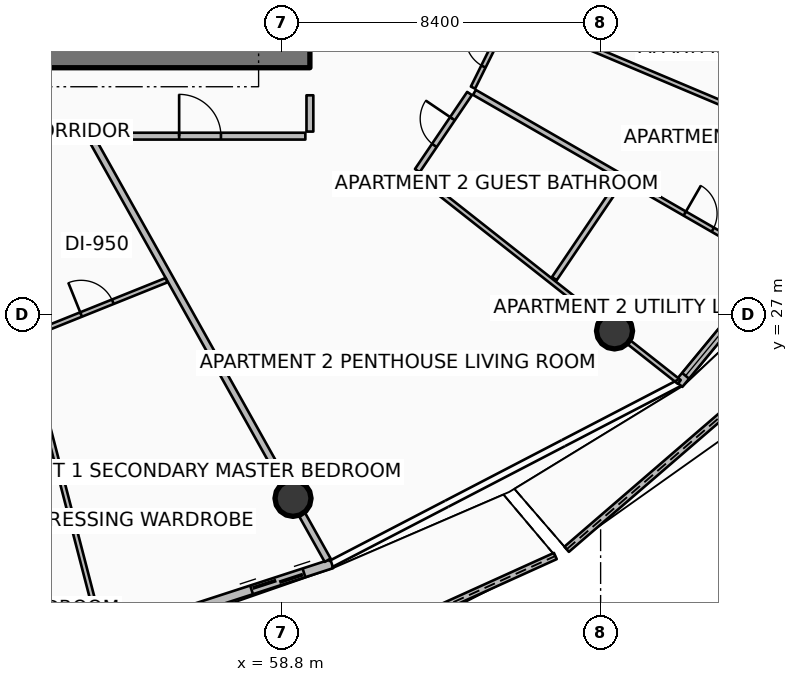
"""IFC4 building model, lengths in metres.
Left out: names, types, materials, properties, quantities, classifications, styles, units other than length and angle.
Written with IfcOpenShell. Run it as: python <this file> out.ifc"""

import sys

from ifc_helpers import new_model, si_unit, direction, frame, frame_2d, origin, origin_2d, place, context, subcontext, project, spatial, polyline, rectangle, circle, outline, extrude, element, fill, save


model = new_model("IFC4")
c1 = context("Model", 3, precision=1e-05, world=origin(), true_north=direction((0.0, 1.0)))
c2 = subcontext(c1, "Body", "Model", "MODEL_VIEW")
j1 = project(units=[si_unit("LENGTHUNIT", "METRE"), si_unit("PLANEANGLEUNIT", "RADIAN")], contexts=[c1])
p1 = place(None, origin())
s1 = spatial("IfcSite", under=j1, at=p1, CompositionType="ELEMENT")
p2 = place(p1, origin())
s2 = spatial("IfcBuilding", under=s1, at=p2, CompositionType="ELEMENT")
p3 = place(p2, frame((0.0, 0.0, 294.45)))
s3 = spatial("IfcBuildingStorey", under=s2, at=p3, CompositionType="ELEMENT", Elevation=294.45)
p4 = place(p3, frame((49.95, 33.75, 0.0), z_axis=(0.0, 0.0, 1.0), x_axis=(1.0, 0.0, 0.0)))
e1 = element("IfcWall", 1, at=p4, inside=s3, PredefinedType="SHEAR", context=c2, shape_type="SweptSolid", body=[
    extrude(rectangle(XDim=9.6, YDim=0.5, at=frame_2d((4.8, 0.0))), origin(), (0.0, 0.0, 1.0), 3.85),
])
for number, where, z_axis, x_axis in (
    (2, (59.105, 22.17, 0.0), (0.0, 0.0, 1.0), (1.0, 0.0, 0.0)),
    (3, (67.566, 26.575, 0.0), (0.0, 0.0, 1.0), (1.0, 0.0, 0.0)),
):
    element("IfcColumn", number, at=place(p3, frame(where, z_axis=z_axis, x_axis=x_axis)), inside=s3, PredefinedType="COLUMN", context=c2, shape_type="SweptSolid", body=[
        extrude(circle(Radius=0.475, at=origin_2d()), origin(), (0.0, 0.0, 1.0), 3.59),
    ])
p5 = place(p3, frame((56.466, 16.33, 0.0), z_axis=(0.0, 0.0, 1.0), x_axis=(0.910900469726, 0.412626143444, 0.0)))
e4 = element("IfcWall", 4, at=p5, inside=s3, PredefinedType="PARAPET", context=c2, shape_type="SweptSolid", body=[
    extrude(outline(polyline([(0.0, 0.0), (10.476, 0.0), (10.476, 1.497), (5.238, 1.696), (0.0, 1.832), (0.0, 0.0)])), frame((0.0, 0.09, 0.0), z_axis=(0.0, -1.0, 0.0), x_axis=(1.0, 0.0, 0.0)), (0.0, 0.0, 1.0), 0.18),
])
p6 = place(p3, frame((66.306, 20.83, 0.0), z_axis=(0.0, 0.0, 1.0), x_axis=(0.757188428153, 0.653196512751, 0.0)))
e5 = element("IfcWall", 5, at=p6, inside=s3, PredefinedType="PARAPET", context=c2, shape_type="SweptSolid", body=[
    extrude(outline(polyline([(0.0, 0.0), (11.278, 0.0), (11.278, 1.148), (5.639, 1.284), (0.0, 1.483), (0.0, 0.0)])), frame((0.0, 0.09, 0.0), z_axis=(0.0, -1.0, 0.0), x_axis=(1.0, 0.0, 0.0)), (0.0, 0.0, 1.0), 0.18),
])
p7 = place(p3, frame((50.858, 17.436, 0.0), z_axis=(0.0, 0.0, 1.0), x_axis=(0.951055974609, 0.309018661507, 0.0)))
e6 = element("IfcWall", 6, at=p7, inside=s3, PredefinedType="SOLIDWALL", context=c2, shape_type="SweptSolid", body=[
    extrude(rectangle(XDim=9.745, YDim=0.24, at=frame_2d((4.873, 0.0))), origin(), (0.0, 0.0, 1.0), 2.54),
])
p8 = place(p7, frame((7.525, 0.0, 0.0)))
e7 = element("IfcOpeningElement", 7, at=p8, cuts=e6, PredefinedType="OPENING", context=c2, shape_type="SweptSolid", body=[
    extrude(rectangle(XDim=1.45, YDim=2.15, at=frame_2d((0.725, 1.075))), frame((0.0, 0.13, 0.0), z_axis=(0.0, -1.0, 0.0), x_axis=(1.0, 0.0, 0.0)), (0.0, 0.0, 1.0), 0.26),
])
p9 = place(p7, frame((0.28, 0.0, 0.65)))
e8 = element("IfcOpeningElement", 8, at=p9, cuts=e6, PredefinedType="OPENING", context=c2, shape_type="SweptSolid", body=[
    extrude(rectangle(XDim=1.6, YDim=1.5, at=frame_2d((0.8, 0.75))), frame((0.0, 0.13, 0.0), z_axis=(0.0, -1.0, 0.0), x_axis=(1.0, 0.0, 0.0)), (0.0, 0.0, 1.0), 0.26),
])
p10 = place(p3, frame((69.258, 25.178, 0.0), z_axis=(0.0, 0.0, 1.0), x_axis=(0.636680093065, 0.771128043255, 0.0)))
e9 = element("IfcWall", 9, at=p10, inside=s3, PredefinedType="SOLIDWALL", context=c2, shape_type="SweptSolid", body=[
    extrude(rectangle(XDim=11.438, YDim=0.24, at=frame_2d((5.719, 0.0))), origin(), (0.0, 0.0, 1.0), 2.54),
])
p11 = place(p10, frame((9.218, 0.0, 0.0)))
e10 = element("IfcOpeningElement", 10, at=p11, cuts=e9, PredefinedType="OPENING", context=c2, shape_type="SweptSolid", body=[
    extrude(rectangle(XDim=1.45, YDim=2.15, at=frame_2d((0.725, 1.075))), frame((0.0, 0.13, 0.0), z_axis=(0.0, -1.0, 0.0), x_axis=(1.0, 0.0, 0.0)), (0.0, 0.0, 1.0), 0.26),
])
p12 = place(p10, frame((0.28, 0.0, 0.65)))
e11 = element("IfcOpeningElement", 11, at=p12, cuts=e9, PredefinedType="OPENING", context=c2, shape_type="SweptSolid", body=[
    extrude(rectangle(XDim=1.6, YDim=1.5, at=frame_2d((0.8, 0.75))), frame((0.0, 0.13, 0.0), z_axis=(0.0, -1.0, 0.0), x_axis=(1.0, 0.0, 0.0)), (0.0, 0.0, 1.0), 0.26),
])
p13 = place(p3, frame((53.822, 31.604, 0.0), z_axis=(0.0, 0.0, 1.0), x_axis=(0.48862858053, -0.872491896976, 0.0)))
e12 = element("IfcWall", 12, at=p13, inside=s3, PredefinedType="PARTITIONING", context=c2, shape_type="SweptSolid", body=[
    extrude(rectangle(XDim=12.679, YDim=0.18, at=frame_2d((6.34, 0.0))), origin(), (0.0, 0.0, 1.0), 2.957),
])
p14 = place(p3, frame((49.339, 31.7, 0.0), z_axis=(0.0, 0.0, 1.0), x_axis=(1.0, 0.0, 0.0)))
e13 = element("IfcWall", 13, at=p14, inside=s3, PredefinedType="PARTITIONING", context=c2, shape_type="SweptSolid", body=[
    extrude(rectangle(XDim=4.309, YDim=0.18, at=frame_2d((2.155, 0.0))), origin(), (0.0, 0.0, 1.0), 2.957),
])
p15 = place(p3, frame((52.065, 26.323, 0.0), z_axis=(0.0, 0.0, 1.0), x_axis=(0.250968538736, -0.967995244082, 0.0)))
e14 = element("IfcWall", 14, at=p15, inside=s3, PredefinedType="PARTITIONING", context=c2, shape_type="SweptSolid", body=[
    extrude(rectangle(XDim=7.968, YDim=0.125, at=frame_2d((3.984, 0.0))), origin(), (0.0, 0.0, 1.0), 3.03),
])
p16 = place(p3, frame((52.116, 26.439, 0.0), z_axis=(0.0, 0.0, 1.0), x_axis=(0.92786943094, 0.372905241486, 0.0)))
e15 = element("IfcWall", 15, at=p16, inside=s3, PredefinedType="PARTITIONING", context=c2, shape_type="SweptSolid", body=[
    extrude(rectangle(XDim=3.945, YDim=0.125, at=frame_2d((1.973, 0.0))), origin(), (0.0, 0.0, 1.0), 2.957),
])
p17 = place(p16, frame((1.523, 0.0, 0.0)))
e16 = element("IfcOpeningElement", 16, at=p17, cuts=e15, PredefinedType="OPENING", context=c2, shape_type="SweptSolid", body=[
    extrude(rectangle(XDim=0.9, YDim=2.08, at=frame_2d((0.45, 1.04))), frame((0.0, 0.073, 0.0), z_axis=(0.0, -1.0, 0.0), x_axis=(1.0, 0.0, 0.0)), (0.0, 0.0, 1.0), 0.145),
])
p18 = place(p3, frame((53.888, 31.7, 0.0), z_axis=(0.0, 0.0, 1.0), x_axis=(1.0, 0.0, 0.0)))
e17 = element("IfcWall", 17, at=p18, inside=s3, PredefinedType="PARTITIONING", context=c2, shape_type="SweptSolid", body=[
    extrude(rectangle(XDim=5.542, YDim=0.18, at=frame_2d((2.771, 0.0))), origin(), (0.0, 0.0, 1.0), 2.957),
])
p19 = place(p18, frame((2.221, 0.0, 0.0)))
e18 = element("IfcOpeningElement", 18, at=p19, cuts=e17, PredefinedType="OPENING", context=c2, shape_type="SweptSolid", body=[
    extrude(rectangle(XDim=1.1, YDim=2.1, at=frame_2d((0.55, 1.05))), frame((0.0, 0.1, 0.0), z_axis=(0.0, -1.0, 0.0), x_axis=(1.0, 0.0, 0.0)), (0.0, 0.0, 1.0), 0.2),
])
p20 = place(p3, frame((59.55, 31.82, 0.0), z_axis=(0.0, 0.0, 1.0), x_axis=(0.0, 1.0, 0.0)))
e19 = element("IfcWall", 19, at=p20, inside=s3, PredefinedType="PARTITIONING", context=c2, shape_type="SweptSolid", body=[
    extrude(rectangle(XDim=0.955, YDim=0.18, at=frame_2d((0.477, 0.0))), origin(), (0.0, 0.0, 1.0), 2.957),
])
p21 = place(p3, frame((62.399, 30.648, 0.0), z_axis=(0.0, 0.0, 1.0), x_axis=(0.785335435896, -0.619070475088, 0.0)))
e20 = element("IfcWall", 20, at=p21, inside=s3, PredefinedType="PARTITIONING", context=c2, shape_type="SweptSolid", body=[
    extrude(rectangle(XDim=8.749, YDim=0.125, at=frame_2d((4.374, 0.0))), origin(), (0.0, 0.0, 1.0), 2.957),
])
p22 = place(p3, frame((62.377, 30.793, 0.0), z_axis=(0.0, 0.0, 1.0), x_axis=(0.560572719222, 0.828105202534, 0.0)))
e21 = element("IfcWall", 21, at=p22, inside=s3, PredefinedType="PARTITIONING", context=c2, shape_type="SweptSolid", body=[
    extrude(rectangle(XDim=2.45, YDim=0.15, at=frame_2d((1.225, 0.0))), origin(), (0.0, 0.0, 1.0), 2.957),
])
p23 = place(p22, frame((0.8, 0.0, 0.0)))
e22 = element("IfcOpeningElement", 22, at=p23, cuts=e21, PredefinedType="OPENING", context=c2, shape_type="SweptSolid", body=[
    extrude(rectangle(XDim=0.85, YDim=2.06, at=frame_2d((0.425, 1.03))), frame((0.0, 0.085, 0.0), z_axis=(0.0, -1.0, 0.0), x_axis=(1.0, 0.0, 0.0)), (0.0, 0.0, 1.0), 0.17),
])
p24 = place(p3, frame((65.982, 27.951, 0.0), z_axis=(0.0, 0.0, 1.0), x_axis=(0.560619338422, 0.82807364249, 0.0)))
e23 = element("IfcWall", 23, at=p24, inside=s3, PredefinedType="PARTITIONING", context=c2, shape_type="SweptSolid", body=[
    extrude(rectangle(XDim=3.115, YDim=0.15, at=frame_2d((1.557, 0.0))), origin(), (0.0, 0.0, 1.0), 2.957),
])
p25 = place(p3, frame((63.879, 32.852, 0.0), z_axis=(0.0, 0.0, 1.0), x_axis=(0.866472506867, -0.499224793899, 0.0)))
e24 = element("IfcWall", 24, at=p25, inside=s3, PredefinedType="PARTITIONING", context=c2, shape_type="SweptSolid", body=[
    extrude(rectangle(XDim=4.46, YDim=0.15, at=frame_2d((2.23, 0.0))), origin(), (0.0, 0.0, 1.0), 3.03),
])
p26 = place(p3, frame((67.856, 30.56, 0.0), z_axis=(0.0, 0.0, 1.0), x_axis=(0.86648068721, -0.499210595533, 0.0)))
e25 = element("IfcWall", 25, at=p26, inside=s3, PredefinedType="PARTITIONING", context=c2, shape_type="SweptSolid", body=[
    extrude(rectangle(XDim=4.447, YDim=0.125, at=frame_2d((2.223, 0.0))), origin(), (0.0, 0.0, 1.0), 3.03),
])
p27 = place(p26, frame((1.798, 0.0, 0.0)))
e26 = element("IfcOpeningElement", 26, at=p27, cuts=e25, PredefinedType="OPENING", context=c2, shape_type="SweptSolid", body=[
    extrude(rectangle(XDim=0.85, YDim=2.06, at=frame_2d((0.425, 1.03))), frame((0.0, 0.073, 0.0), z_axis=(0.0, -1.0, 0.0), x_axis=(1.0, 0.0, 0.0)), (0.0, 0.0, 1.0), 0.145),
])
p28 = place(p3, frame((64.888, 34.884, 0.0), z_axis=(0.0, 0.0, 1.0), x_axis=(0.921531711532, -0.388303109235, 0.0)))
e27 = element("IfcWall", 27, at=p28, inside=s3, PredefinedType="PARTITIONING", context=c2, shape_type="SweptSolid", body=[
    extrude(rectangle(XDim=9.845, YDim=0.125, at=frame_2d((4.922, 0.0))), origin(), (0.0, 0.0, 1.0), 3.03),
])
p29 = place(p3, frame((63.841, 32.977, 0.0), z_axis=(0.0, 0.0, 1.0), x_axis=(0.444545737729, 0.895756153798, 0.0)))
e28 = element("IfcWall", 28, at=p29, inside=s3, PredefinedType="PARTITIONING", context=c2, shape_type="SweptSolid", body=[
    extrude(rectangle(XDim=2.088, YDim=0.125, at=frame_2d((1.044, 0.0))), origin(), (0.0, 0.0, 1.0), 3.03),
])
p30 = place(p29, frame((0.619, 0.0, 0.0)))
e29 = element("IfcOpeningElement", 29, at=p30, cuts=e28, PredefinedType="OPENING", context=c2, shape_type="SweptSolid", body=[
    extrude(rectangle(XDim=0.85, YDim=2.06, at=frame_2d((0.425, 1.03))), frame((0.0, 0.073, 0.0), z_axis=(0.0, -1.0, 0.0), x_axis=(1.0, 0.0, 0.0)), (0.0, 0.0, 1.0), 0.145),
])
p31 = place(p8, origin())
e30 = element("IfcDoor", 30, at=p31, inside=s3, OperationType="DOUBLE_DOOR_SLIDING", PredefinedType="DOOR", context=c2, shape_type="SweptSolid", body=[
    extrude(rectangle(XDim=1.45, YDim=2.15, at=frame_2d((0.725, 1.075))), frame((0.0, 0.025, 0.0), z_axis=(0.0, -1.0, 0.0), x_axis=(1.0, 0.0, 0.0)), (0.0, 0.0, 1.0), 0.05),
])
fill(e7, e30)
p32 = place(p12, origin())
e31 = element("IfcWindow", 31, at=p32, inside=s3, PartitioningType="SINGLE_PANEL", PredefinedType="WINDOW", context=c2, shape_type="SweptSolid", body=[
    extrude(rectangle(XDim=1.6, YDim=1.5, at=frame_2d((0.8, 0.75))), frame((0.0, 0.03, 0.0), z_axis=(0.0, -1.0, 0.0), x_axis=(1.0, 0.0, 0.0)), (0.0, 0.0, 1.0), 0.06),
])
fill(e11, e31)
p33 = place(p17, origin())
e32 = element("IfcDoor", 32, at=p33, inside=s3, OperationType="SINGLE_SWING_LEFT", PredefinedType="DOOR", context=c2, shape_type="SweptSolid", body=[
    extrude(rectangle(XDim=0.9, YDim=2.08, at=frame_2d((0.45, 1.04))), frame((0.0, 0.025, 0.0), z_axis=(0.0, -1.0, 0.0), x_axis=(1.0, 0.0, 0.0)), (0.0, 0.0, 1.0), 0.05),
])
fill(e16, e32)
p34 = place(p19, origin())
e33 = element("IfcDoor", 33, at=p34, inside=s3, OperationType="SINGLE_SWING_LEFT", PredefinedType="DOOR", context=c2, shape_type="SweptSolid", body=[
    extrude(rectangle(XDim=1.1, YDim=2.1, at=frame_2d((0.55, 1.05))), frame((0.0, 0.025, 0.0), z_axis=(0.0, -1.0, 0.0), x_axis=(1.0, 0.0, 0.0)), (0.0, 0.0, 1.0), 0.05),
])
fill(e18, e33)
p35 = place(p23, origin())
e34 = element("IfcDoor", 34, at=p35, inside=s3, OperationType="SINGLE_SWING_RIGHT", PredefinedType="DOOR", context=c2, shape_type="SweptSolid", body=[
    extrude(rectangle(XDim=0.85, YDim=2.06, at=frame_2d((0.425, 1.03))), frame((0.0, 0.025, 0.0), z_axis=(0.0, -1.0, 0.0), x_axis=(1.0, 0.0, 0.0)), (0.0, 0.0, 1.0), 0.05),
])
fill(e22, e34)
p36 = place(p27, origin())
e35 = element("IfcDoor", 35, at=p36, inside=s3, OperationType="SINGLE_SWING_LEFT", PredefinedType="DOOR", context=c2, shape_type="SweptSolid", body=[
    extrude(rectangle(XDim=0.85, YDim=2.06, at=frame_2d((0.425, 1.03))), frame((0.0, 0.025, 0.0), z_axis=(0.0, -1.0, 0.0), x_axis=(1.0, 0.0, 0.0)), (0.0, 0.0, 1.0), 0.05),
])
fill(e26, e35)
p37 = place(p30, origin())
e36 = element("IfcDoor", 36, at=p37, inside=s3, OperationType="SINGLE_SWING_RIGHT", PredefinedType="DOOR", context=c2, shape_type="SweptSolid", body=[
    extrude(rectangle(XDim=0.85, YDim=2.06, at=frame_2d((0.425, 1.03))), frame((0.0, 0.025, 0.0), z_axis=(0.0, -1.0, 0.0), x_axis=(1.0, 0.0, 0.0)), (0.0, 0.0, 1.0), 0.05),
])
fill(e29, e36)
save(model, sys.argv[1])
